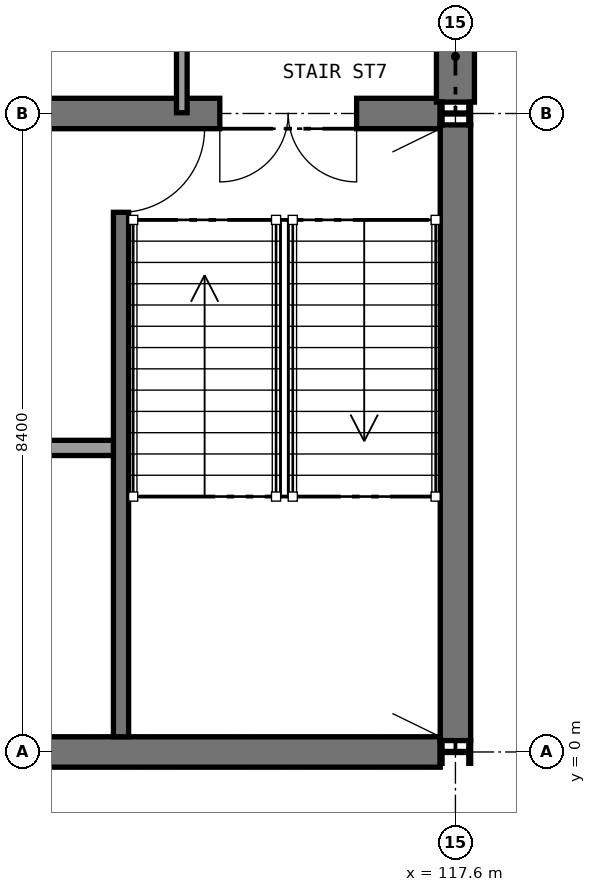
"""IFC4 building model, lengths in metres.
Left out: names, types, materials, properties, quantities, classifications, styles, units other than length and angle.
Written with IfcOpenShell. Run it as: python <this file> out.ifc"""

import sys

from ifc_helpers import new_model, si_unit, direction, frame, frame_2d, origin, origin_2d, place, context, subcontext, project, spatial, rectangle, i_section, extrude, element, fill, save


model = new_model("IFC4")
c1 = context("Model", 3, precision=1e-05, world=origin(), true_north=direction((0.0, 1.0)))
c2 = subcontext(c1, "Body", "Model", "MODEL_VIEW")
j1 = project(units=[si_unit("LENGTHUNIT", "METRE"), si_unit("PLANEANGLEUNIT", "RADIAN")], contexts=[c1])
p1 = place(None, origin())
s1 = spatial("IfcSite", under=j1, at=p1, CompositionType="ELEMENT")
p2 = place(p1, origin())
s2 = spatial("IfcBuilding", under=s1, at=p2, CompositionType="ELEMENT")
p3 = place(p2, frame((0.0, 0.0, 21.0)))
s3 = spatial("IfcBuildingStorey", under=s2, at=p3, CompositionType="ELEMENT", Elevation=21.0)
p4 = place(p3, frame((100.95, 0.0, 0.0), z_axis=(0.0, 0.0, 1.0), x_axis=(1.0, 0.0, 0.0)))
e1 = element("IfcWall", 1, at=p4, inside=s3, PredefinedType="SHEAR", context=c2, shape_type="SweptSolid", body=[
    extrude(rectangle(XDim=16.45, YDim=0.4, at=frame_2d((8.225, 0.0))), origin(), (0.0, 0.0, 1.0), 4.65),
])
p5 = place(p3, frame((100.95, 8.4, 0.0), z_axis=(0.0, 0.0, 1.0), x_axis=(1.0, 0.0, 0.0)))
e2 = element("IfcWall", 2, at=p5, inside=s3, PredefinedType="SHEAR", context=c2, shape_type="SweptSolid", body=[
    extrude(rectangle(XDim=16.45, YDim=0.4, at=frame_2d((8.225, 0.0))), origin(), (0.0, 0.0, 1.0), 4.65),
])
p6 = place(p5, frame((13.55, 0.0, 0.0)))
e3 = element("IfcOpeningElement", 3, at=p6, cuts=e2, PredefinedType="OPENING", context=c2, shape_type="SweptSolid", body=[
    extrude(rectangle(XDim=1.8, YDim=2.1, at=frame_2d((0.9, 1.05))), frame((0.0, 0.21, 0.0), z_axis=(0.0, -1.0, 0.0), x_axis=(1.0, 0.0, 0.0)), (0.0, 0.0, 1.0), 0.42),
])
p7 = place(p5, frame((4.65, 0.0, 0.0)))
e4 = element("IfcOpeningElement", 4, at=p7, cuts=e2, PredefinedType="OPENING", context=c2, shape_type="SweptSolid", body=[
    extrude(rectangle(XDim=2.4, YDim=2.4, at=frame_2d((1.2, 1.2))), frame((0.0, 0.21, 0.0), z_axis=(0.0, -1.0, 0.0), x_axis=(1.0, 0.0, 0.0)), (0.0, 0.0, 1.0), 0.42),
])
p8 = place(p3, frame((117.6, 0.15, 0.0), z_axis=(0.0, 0.0, 1.0), x_axis=(0.0, 1.0, 0.0)))
e5 = element("IfcWall", 5, at=p8, inside=s3, PredefinedType="SHEAR", context=c2, shape_type="SweptSolid", body=[
    extrude(rectangle(XDim=8.1, YDim=0.4, at=frame_2d((4.05, 0.0))), origin(), (0.0, 0.0, 1.0), 4.65),
])
for number, where, z_axis, x_axis in (
    (6, (117.6, 0.0, 0.0), (0.0, 0.0, 1.0), (0.0, 1.0, 0.0)),
    (7, (117.6, 8.4, 0.0), (0.0, 0.0, 1.0), (0.0, 1.0, 0.0)),
):
    element("IfcColumn", number, at=place(p3, frame(where, z_axis=z_axis, x_axis=x_axis)), inside=s3, PredefinedType="COLUMN", context=c2, shape_type="SweptSolid", body=[
        extrude(i_section(OverallWidth=0.3, OverallDepth=0.4, WebThickness=0.013, FlangeThickness=0.024, FilletRadius=0.027, at=origin_2d()), origin(), (0.0, 0.0, 1.0), 4.8),
    ])
p9 = place(p3, frame((114.0, 8.41, 0.0), z_axis=(0.0, 0.0, 1.0), x_axis=(0.0, 1.0, 0.0)))
e8 = element("IfcWall", 8, at=p9, inside=s3, PredefinedType="PARTITIONING", context=c2, shape_type="SweptSolid", body=[
    extrude(rectangle(XDim=7.1, YDim=0.14, at=frame_2d((3.55, 0.0))), origin(), (0.0, 0.0, 1.0), 4.65),
])
p10 = place(p3, frame((117.6, 8.55, 0.0), z_axis=(0.0, 0.0, 1.0), x_axis=(0.0, 1.0, 0.0)))
e9 = element("IfcWall", 9, at=p10, inside=s3, PredefinedType="STANDARD", context=c2, shape_type="SweptSolid", body=[
    extrude(rectangle(XDim=8.1, YDim=0.5, at=frame_2d((4.05, 0.0))), origin(), (0.0, 0.0, 1.0), 4.65),
])
p11 = place(p10, frame((1.2, 0.0, 1.0)))
e10 = element("IfcOpeningElement", 10, at=p11, cuts=e9, PredefinedType="OPENING", context=c2, shape_type="SweptSolid", body=[
    extrude(rectangle(XDim=1.5, YDim=2.4, at=frame_2d((0.75, 1.2))), frame((0.0, 0.26, 0.0), z_axis=(0.0, -1.0, 0.0), x_axis=(1.0, 0.0, 0.0)), (0.0, 0.0, 1.0), 0.52),
])
p12 = place(p10, frame((5.4, 0.0, 1.0)))
e11 = element("IfcOpeningElement", 11, at=p12, cuts=e9, PredefinedType="OPENING", context=c2, shape_type="SweptSolid", body=[
    extrude(rectangle(XDim=1.5, YDim=2.4, at=frame_2d((0.75, 1.2))), frame((0.0, 0.26, 0.0), z_axis=(0.0, -1.0, 0.0), x_axis=(1.0, 0.0, 0.0)), (0.0, 0.0, 1.0), 0.52),
])
p13 = place(p3, frame((113.2, 0.2, 0.0), z_axis=(0.0, 0.0, 1.0), x_axis=(0.0, 1.0, 0.0)))
e12 = element("IfcWall", 12, at=p13, inside=s3, PredefinedType="SHEAR", context=c2, shape_type="SweptSolid", body=[
    extrude(rectangle(XDim=8.0, YDim=0.2, at=frame_2d((4.0, 0.0))), origin(), (0.0, 0.0, 1.0), 4.65),
])
p14 = place(p13, frame((6.9, 0.0, 0.0)))
e13 = element("IfcOpeningElement", 13, at=p14, cuts=e12, PredefinedType="OPENING", context=c2, shape_type="SweptSolid", body=[
    extrude(rectangle(XDim=1.11, YDim=2.1, at=frame_2d((0.555, 1.05))), frame((0.0, 0.11, 0.0), z_axis=(0.0, -1.0, 0.0), x_axis=(1.0, 0.0, 0.0)), (0.0, 0.0, 1.0), 0.22),
])
p15 = place(p3, frame((109.8, 4.0, 0.0), z_axis=(0.0, 0.0, 1.0), x_axis=(1.0, 0.0, 0.0)))
e14 = element("IfcWall", 14, at=p15, inside=s3, PredefinedType="PARTITIONING", context=c2, shape_type="SweptSolid", body=[
    extrude(rectangle(XDim=3.3, YDim=0.2, at=frame_2d((1.65, 0.0))), origin(), (0.0, 0.0, 1.0), 4.65),
])
p16 = place(p15, frame((1.15, 0.0, 0.0)))
e15 = element("IfcOpeningElement", 15, at=p16, cuts=e14, PredefinedType="OPENING", context=c2, shape_type="SweptSolid", body=[
    extrude(rectangle(XDim=1.0, YDim=2.1, at=frame_2d((0.5, 1.05))), frame((0.0, 0.11, 0.0), z_axis=(0.0, -1.0, 0.0), x_axis=(1.0, 0.0, 0.0)), (0.0, 0.0, 1.0), 0.22),
])
p17 = place(p14, frame((1.1, 0.0, 0.0), z_axis=(0.0, 0.0, 1.0), x_axis=(-1.0, 0.0, 0.0)))
e16 = element("IfcDoor", 16, at=p17, inside=s3, OperationType="SINGLE_SWING_LEFT", PredefinedType="DOOR", context=c2, shape_type="SweptSolid", body=[
    extrude(rectangle(XDim=1.1, YDim=2.1, at=frame_2d((0.55, 1.05))), frame((0.0, 0.025, 0.0), z_axis=(0.0, -1.0, 0.0), x_axis=(1.0, 0.0, 0.0)), (0.0, 0.0, 1.0), 0.05),
])
fill(e13, e16)
p18 = place(p6, frame((1.8, 0.0, 0.0), z_axis=(0.0, 0.0, 1.0), x_axis=(-1.0, 0.0, 0.0)))
e17 = element("IfcDoor", 17, at=p18, inside=s3, OperationType="DOUBLE_DOOR_SINGLE_SWING", PredefinedType="DOOR", context=c2, shape_type="SweptSolid", body=[
    extrude(rectangle(XDim=1.8, YDim=2.1, at=frame_2d((0.9, 1.05))), frame((0.0, 0.025, 0.0), z_axis=(0.0, -1.0, 0.0), x_axis=(1.0, 0.0, 0.0)), (0.0, 0.0, 1.0), 0.05),
])
fill(e3, e17)
save(model, sys.argv[1])
